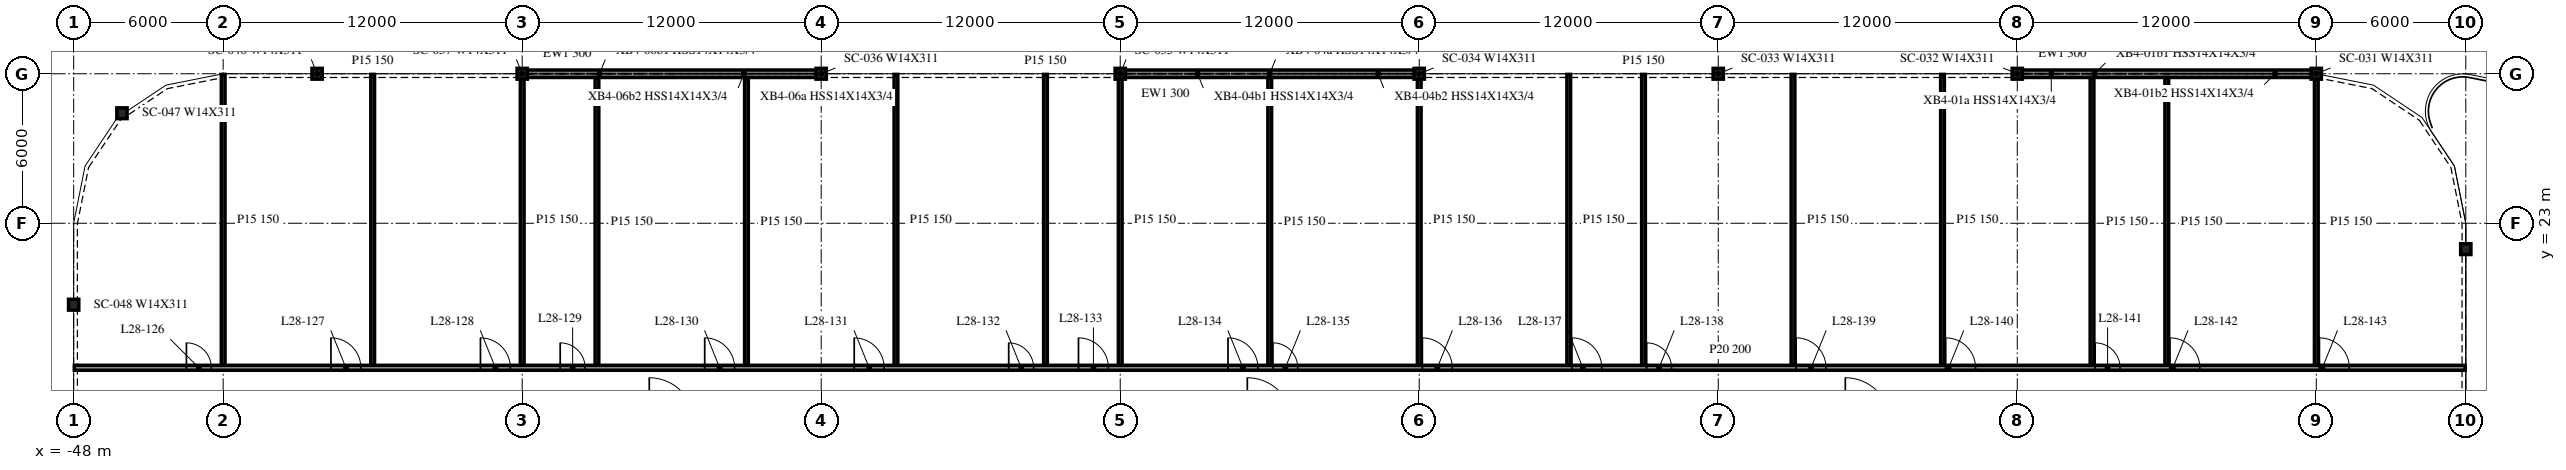
"""IFC4 building model, lengths in metres.
Left out: names, types, materials, properties, quantities, classifications, styles, units other than length and angle.
Written with IfcOpenShell. Run it as: python <this file> out.ifc"""

import sys

from ifc_helpers import new_model, si_unit, direction, frame, frame_2d, origin, origin_2d, place, context, subcontext, project, spatial, rectangle, i_section, extrude, element, fill, save


model = new_model("IFC4")
c1 = context("Model", 3, precision=1e-05, world=origin(), true_north=direction((0.0, 1.0)))
c2 = subcontext(c1, "Body", "Model", "MODEL_VIEW")
j1 = project(units=[si_unit("LENGTHUNIT", "METRE"), si_unit("PLANEANGLEUNIT", "RADIAN")], contexts=[c1])
p1 = place(None, origin())
s1 = spatial("IfcSite", under=j1, at=p1, CompositionType="ELEMENT")
p2 = place(p1, origin())
s2 = spatial("IfcBuilding", under=s1, at=p2, CompositionType="ELEMENT")
p3 = place(p2, frame((0.0, 0.0, 122.0)))
s3 = spatial("IfcBuildingStorey", under=s2, at=p3, CompositionType="ELEMENT", Elevation=122.0)
for number, where, z_axis, x_axis in (
    (1, (42.0, 29.0, -0.34), (0.0, 0.0, 1.0), (1.0, 0.0, 0.0)),
    (2, (30.0, 29.0, -0.34), (0.0, 0.0, 1.0), (1.0, 0.0, 0.0)),
    (3, (18.0, 29.0, -0.34), (0.0, 0.0, 1.0), (1.0, 0.0, 0.0)),
    (4, (6.0, 29.0, -0.34), (0.0, 0.0, 1.0), (1.0, 0.0, 0.0)),
    (5, (-6.0, 29.0, -0.34), (0.0, 0.0, 1.0), (1.0, 0.0, 0.0)),
    (6, (-18.0, 29.0, -0.34), (0.0, 0.0, 1.0), (1.0, 0.0, 0.0)),
    (7, (-30.0, 29.0, -0.34), (0.0, 0.0, 1.0), (1.0, 0.0, 0.0)),
    (8, (-38.231, 29.0, -0.34), (0.0, 0.0, 1.0), (1.0, 0.0, 0.0)),
    (9, (-46.062, 27.416, -0.34), (0.0, 0.0, 1.0), (1.0, 0.0, 0.0)),
    (10, (-48.0, 19.731, -0.34), (0.0, 0.0, 1.0), (1.0, 0.0, 0.0)),
    (11, (48.0, 21.962, -0.34), (0.0, 0.0, 1.0), (1.0, 0.0, 0.0)),
):
    element("IfcColumn", number, at=place(p3, frame(where, z_axis=z_axis, x_axis=x_axis)), inside=s3, PredefinedType="COLUMN", context=c2, shape_type="SweptSolid", body=[
        extrude(i_section(OverallWidth=0.412, OverallDepth=0.434, WebThickness=0.036, FlangeThickness=0.057, at=origin_2d()), origin(), (0.0, 0.0, 1.0), 4.1),
    ])
for number, where, z_axis, x_axis in (
    (12, (41.982, 29.0, 0.0), (0.0, 0.0, 1.0), (-1.0, 0.0, 0.0)),
    (13, (5.982, 29.0, 0.0), (0.0, 0.0, 1.0), (-1.0, 0.0, 0.0)),
    (14, (-18.018, 29.0, 0.0), (0.0, 0.0, 1.0), (-1.0, 0.0, 0.0)),
):
    element("IfcWall", number, at=place(p3, frame(where, z_axis=z_axis, x_axis=x_axis)), inside=s3, PredefinedType="NOTDEFINED", context=c2, shape_type="SweptSolid", body=[
        extrude(rectangle(XDim=11.964, YDim=0.3, at=frame_2d((5.982, 0.0))), origin(), (0.0, 0.0, 1.0), 3.003),
    ])
p4 = place(p3, frame((-47.975, 17.2, 0.0), z_axis=(0.0, 0.0, 1.0), x_axis=(1.0, 0.0, 0.0)))
e15 = element("IfcWall", 15, at=p4, inside=s3, PredefinedType="PARTITIONING", context=c2, shape_type="SweptSolid", body=[
    extrude(rectangle(XDim=95.95, YDim=0.2, at=frame_2d((47.975, 0.0))), origin(), (0.0, 0.0, 1.0), 3.76),
])
p5 = place(p4, frame((4.5, 0.0, 0.0)))
e16 = element("IfcOpeningElement", 16, at=p5, cuts=e15, PredefinedType="OPENING", context=c2, shape_type="SweptSolid", body=[
    extrude(rectangle(XDim=1.0, YDim=2.1, at=frame_2d((0.5, 1.05))), frame((0.0, 0.11, 0.0), z_axis=(0.0, -1.0, 0.0), x_axis=(1.0, 0.0, 0.0)), (0.0, 0.0, 1.0), 0.22),
])
p6 = place(p4, frame((10.3, 0.0, 0.0)))
e17 = element("IfcOpeningElement", 17, at=p6, cuts=e15, PredefinedType="OPENING", context=c2, shape_type="SweptSolid", body=[
    extrude(rectangle(XDim=1.2, YDim=2.1, at=frame_2d((0.6, 1.05))), frame((0.0, 0.11, 0.0), z_axis=(0.0, -1.0, 0.0), x_axis=(1.0, 0.0, 0.0)), (0.0, 0.0, 1.0), 0.22),
])
p7 = place(p4, frame((16.3, 0.0, 0.0)))
e18 = element("IfcOpeningElement", 18, at=p7, cuts=e15, PredefinedType="OPENING", context=c2, shape_type="SweptSolid", body=[
    extrude(rectangle(XDim=1.2, YDim=2.1, at=frame_2d((0.6, 1.05))), frame((0.0, 0.11, 0.0), z_axis=(0.0, -1.0, 0.0), x_axis=(1.0, 0.0, 0.0)), (0.0, 0.0, 1.0), 0.22),
])
p8 = place(p4, frame((19.5, 0.0, 0.0)))
e19 = element("IfcOpeningElement", 19, at=p8, cuts=e15, PredefinedType="OPENING", context=c2, shape_type="SweptSolid", body=[
    extrude(rectangle(XDim=1.0, YDim=2.1, at=frame_2d((0.5, 1.05))), frame((0.0, 0.11, 0.0), z_axis=(0.0, -1.0, 0.0), x_axis=(1.0, 0.0, 0.0)), (0.0, 0.0, 1.0), 0.22),
])
p9 = place(p4, frame((25.3, 0.0, 0.0)))
e20 = element("IfcOpeningElement", 20, at=p9, cuts=e15, PredefinedType="OPENING", context=c2, shape_type="SweptSolid", body=[
    extrude(rectangle(XDim=1.2, YDim=2.1, at=frame_2d((0.6, 1.05))), frame((0.0, 0.11, 0.0), z_axis=(0.0, -1.0, 0.0), x_axis=(1.0, 0.0, 0.0)), (0.0, 0.0, 1.0), 0.22),
])
p10 = place(p4, frame((31.3, 0.0, 0.0)))
e21 = element("IfcOpeningElement", 21, at=p10, cuts=e15, PredefinedType="OPENING", context=c2, shape_type="SweptSolid", body=[
    extrude(rectangle(XDim=1.2, YDim=2.1, at=frame_2d((0.6, 1.05))), frame((0.0, 0.11, 0.0), z_axis=(0.0, -1.0, 0.0), x_axis=(1.0, 0.0, 0.0)), (0.0, 0.0, 1.0), 0.22),
])
p11 = place(p4, frame((37.5, 0.0, 0.0)))
e22 = element("IfcOpeningElement", 22, at=p11, cuts=e15, PredefinedType="OPENING", context=c2, shape_type="SweptSolid", body=[
    extrude(rectangle(XDim=1.0, YDim=2.1, at=frame_2d((0.5, 1.05))), frame((0.0, 0.11, 0.0), z_axis=(0.0, -1.0, 0.0), x_axis=(1.0, 0.0, 0.0)), (0.0, 0.0, 1.0), 0.22),
])
p12 = place(p4, frame((40.3, 0.0, 0.0)))
e23 = element("IfcOpeningElement", 23, at=p12, cuts=e15, PredefinedType="OPENING", context=c2, shape_type="SweptSolid", body=[
    extrude(rectangle(XDim=1.2, YDim=2.1, at=frame_2d((0.6, 1.05))), frame((0.0, 0.11, 0.0), z_axis=(0.0, -1.0, 0.0), x_axis=(1.0, 0.0, 0.0)), (0.0, 0.0, 1.0), 0.22),
])
p13 = place(p4, frame((46.3, 0.0, 0.0)))
e24 = element("IfcOpeningElement", 24, at=p13, cuts=e15, PredefinedType="OPENING", context=c2, shape_type="SweptSolid", body=[
    extrude(rectangle(XDim=1.2, YDim=2.1, at=frame_2d((0.6, 1.05))), frame((0.0, 0.11, 0.0), z_axis=(0.0, -1.0, 0.0), x_axis=(1.0, 0.0, 0.0)), (0.0, 0.0, 1.0), 0.22),
])
p14 = place(p4, frame((48.1, 0.0, 0.0)))
e25 = element("IfcOpeningElement", 25, at=p14, cuts=e15, PredefinedType="OPENING", context=c2, shape_type="SweptSolid", body=[
    extrude(rectangle(XDim=1.0, YDim=2.1, at=frame_2d((0.5, 1.05))), frame((0.0, 0.11, 0.0), z_axis=(0.0, -1.0, 0.0), x_axis=(1.0, 0.0, 0.0)), (0.0, 0.0, 1.0), 0.22),
])
p15 = place(p4, frame((54.1, 0.0, 0.0)))
e26 = element("IfcOpeningElement", 26, at=p15, cuts=e15, PredefinedType="OPENING", context=c2, shape_type="SweptSolid", body=[
    extrude(rectangle(XDim=1.2, YDim=2.1, at=frame_2d((0.6, 1.05))), frame((0.0, 0.11, 0.0), z_axis=(0.0, -1.0, 0.0), x_axis=(1.0, 0.0, 0.0)), (0.0, 0.0, 1.0), 0.22),
])
p16 = place(p4, frame((60.1, 0.0, 0.0)))
e27 = element("IfcOpeningElement", 27, at=p16, cuts=e15, PredefinedType="OPENING", context=c2, shape_type="SweptSolid", body=[
    extrude(rectangle(XDim=1.2, YDim=2.1, at=frame_2d((0.6, 1.05))), frame((0.0, 0.11, 0.0), z_axis=(0.0, -1.0, 0.0), x_axis=(1.0, 0.0, 0.0)), (0.0, 0.0, 1.0), 0.22),
])
p17 = place(p4, frame((63.1, 0.0, 0.0)))
e28 = element("IfcOpeningElement", 28, at=p17, cuts=e15, PredefinedType="OPENING", context=c2, shape_type="SweptSolid", body=[
    extrude(rectangle(XDim=1.0, YDim=2.1, at=frame_2d((0.5, 1.05))), frame((0.0, 0.11, 0.0), z_axis=(0.0, -1.0, 0.0), x_axis=(1.0, 0.0, 0.0)), (0.0, 0.0, 1.0), 0.22),
])
p18 = place(p4, frame((69.1, 0.0, 0.0)))
e29 = element("IfcOpeningElement", 29, at=p18, cuts=e15, PredefinedType="OPENING", context=c2, shape_type="SweptSolid", body=[
    extrude(rectangle(XDim=1.2, YDim=2.1, at=frame_2d((0.6, 1.05))), frame((0.0, 0.11, 0.0), z_axis=(0.0, -1.0, 0.0), x_axis=(1.0, 0.0, 0.0)), (0.0, 0.0, 1.0), 0.22),
])
p19 = place(p4, frame((75.1, 0.0, 0.0)))
e30 = element("IfcOpeningElement", 30, at=p19, cuts=e15, PredefinedType="OPENING", context=c2, shape_type="SweptSolid", body=[
    extrude(rectangle(XDim=1.2, YDim=2.1, at=frame_2d((0.6, 1.05))), frame((0.0, 0.11, 0.0), z_axis=(0.0, -1.0, 0.0), x_axis=(1.0, 0.0, 0.0)), (0.0, 0.0, 1.0), 0.22),
])
p20 = place(p4, frame((81.1, 0.0, 0.0)))
e31 = element("IfcOpeningElement", 31, at=p20, cuts=e15, PredefinedType="OPENING", context=c2, shape_type="SweptSolid", body=[
    extrude(rectangle(XDim=1.0, YDim=2.1, at=frame_2d((0.5, 1.05))), frame((0.0, 0.11, 0.0), z_axis=(0.0, -1.0, 0.0), x_axis=(1.0, 0.0, 0.0)), (0.0, 0.0, 1.0), 0.22),
])
p21 = place(p4, frame((84.1, 0.0, 0.0)))
e32 = element("IfcOpeningElement", 32, at=p21, cuts=e15, PredefinedType="OPENING", context=c2, shape_type="SweptSolid", body=[
    extrude(rectangle(XDim=1.2, YDim=2.1, at=frame_2d((0.6, 1.05))), frame((0.0, 0.11, 0.0), z_axis=(0.0, -1.0, 0.0), x_axis=(1.0, 0.0, 0.0)), (0.0, 0.0, 1.0), 0.22),
])
p22 = place(p4, frame((90.1, 0.0, 0.0)))
e33 = element("IfcOpeningElement", 33, at=p22, cuts=e15, PredefinedType="OPENING", context=c2, shape_type="SweptSolid", body=[
    extrude(rectangle(XDim=1.2, YDim=2.1, at=frame_2d((0.6, 1.05))), frame((0.0, 0.11, 0.0), z_axis=(0.0, -1.0, 0.0), x_axis=(1.0, 0.0, 0.0)), (0.0, 0.0, 1.0), 0.22),
])
for number, where, z_axis, x_axis in (
    (34, (-42.0, 17.3, 0.0), (0.0, 0.0, 1.0), (0.0, 1.0, 0.0)),
    (35, (-36.0, 17.3, 0.0), (0.0, 0.0, 1.0), (0.0, 1.0, 0.0)),
    (36, (-30.0, 17.3, 0.0), (0.0, 0.0, 1.0), (0.0, 1.0, 0.0)),
):
    element("IfcWall", number, at=place(p3, frame(where, z_axis=z_axis, x_axis=x_axis)), inside=s3, PredefinedType="PARTITIONING", context=c2, shape_type="SweptSolid", body=[
        extrude(rectangle(XDim=11.675, YDim=0.15, at=frame_2d((5.837, 0.0))), origin(), (0.0, 0.0, 1.0), 3.76),
    ])
for number, where, z_axis, x_axis in (
    (37, (-27.0, 17.3, 0.0), (0.0, 0.0, 1.0), (0.0, 1.0, 0.0)),
    (38, (-21.0, 17.3, 0.0), (0.0, 0.0, 1.0), (0.0, 1.0, 0.0)),
):
    element("IfcWall", number, at=place(p3, frame(where, z_axis=z_axis, x_axis=x_axis)), inside=s3, PredefinedType="PARTITIONING", context=c2, shape_type="SweptSolid", body=[
        extrude(rectangle(XDim=11.55, YDim=0.15, at=frame_2d((5.775, 0.0))), origin(), (0.0, 0.0, 1.0), 3.76),
    ])
for number, where, z_axis, x_axis in (
    (39, (-15.0, 17.3, 0.0), (0.0, 0.0, 1.0), (0.0, 1.0, 0.0)),
    (40, (-9.0, 17.3, 0.0), (0.0, 0.0, 1.0), (0.0, 1.0, 0.0)),
    (41, (-6.0, 17.3, 0.0), (0.0, 0.0, 1.0), (0.0, 1.0, 0.0)),
):
    element("IfcWall", number, at=place(p3, frame(where, z_axis=z_axis, x_axis=x_axis)), inside=s3, PredefinedType="PARTITIONING", context=c2, shape_type="SweptSolid", body=[
        extrude(rectangle(XDim=11.675, YDim=0.15, at=frame_2d((5.837, 0.0))), origin(), (0.0, 0.0, 1.0), 3.76),
    ])
p23 = place(p3, frame((0.0, 17.3, 0.0), z_axis=(0.0, 0.0, 1.0), x_axis=(0.0, 1.0, 0.0)))
e42 = element("IfcWall", 42, at=p23, inside=s3, PredefinedType="PARTITIONING", context=c2, shape_type="SweptSolid", body=[
    extrude(rectangle(XDim=11.55, YDim=0.15, at=frame_2d((5.775, 0.0))), origin(), (0.0, 0.0, 1.0), 3.76),
])
for number, where, z_axis, x_axis in (
    (43, (6.0, 17.3, 0.0), (0.0, 0.0, 1.0), (0.0, 1.0, 0.0)),
    (44, (12.0, 17.3, 0.0), (0.0, 0.0, 1.0), (0.0, 1.0, 0.0)),
    (45, (15.0, 17.3, 0.0), (0.0, 0.0, 1.0), (0.0, 1.0, 0.0)),
    (46, (21.0, 17.3, 0.0), (0.0, 0.0, 1.0), (0.0, 1.0, 0.0)),
    (47, (27.0, 17.3, 0.0), (0.0, 0.0, 1.0), (0.0, 1.0, 0.0)),
):
    element("IfcWall", number, at=place(p3, frame(where, z_axis=z_axis, x_axis=x_axis)), inside=s3, PredefinedType="PARTITIONING", context=c2, shape_type="SweptSolid", body=[
        extrude(rectangle(XDim=11.675, YDim=0.15, at=frame_2d((5.837, 0.0))), origin(), (0.0, 0.0, 1.0), 3.76),
    ])
for number, where, z_axis, x_axis in (
    (48, (33.0, 17.3, 0.0), (0.0, 0.0, 1.0), (0.0, 1.0, 0.0)),
    (49, (36.0, 17.3, 0.0), (0.0, 0.0, 1.0), (0.0, 1.0, 0.0)),
):
    element("IfcWall", number, at=place(p3, frame(where, z_axis=z_axis, x_axis=x_axis)), inside=s3, PredefinedType="PARTITIONING", context=c2, shape_type="SweptSolid", body=[
        extrude(rectangle(XDim=11.55, YDim=0.15, at=frame_2d((5.775, 0.0))), origin(), (0.0, 0.0, 1.0), 3.76),
    ])
p24 = place(p3, frame((42.0, 17.3, 0.0), z_axis=(0.0, 0.0, 1.0), x_axis=(0.0, 1.0, 0.0)))
e50 = element("IfcWall", 50, at=p24, inside=s3, PredefinedType="PARTITIONING", context=c2, shape_type="SweptSolid", body=[
    extrude(rectangle(XDim=11.547, YDim=0.15, at=frame_2d((5.773, 0.0))), origin(), (0.0, 0.0, 1.0), 3.76),
])
p25 = place(p5, origin())
e51 = element("IfcDoor", 51, at=p25, inside=s3, OperationType="SINGLE_SWING_LEFT", PredefinedType="DOOR", context=c2, shape_type="SweptSolid", body=[
    extrude(rectangle(XDim=1.0, YDim=2.1, at=frame_2d((0.5, 1.05))), frame((0.0, 0.025, 0.0), z_axis=(0.0, -1.0, 0.0), x_axis=(1.0, 0.0, 0.0)), (0.0, 0.0, 1.0), 0.05),
])
fill(e16, e51)
p26 = place(p6, origin())
e52 = element("IfcDoor", 52, at=p26, inside=s3, OperationType="SINGLE_SWING_LEFT", PredefinedType="DOOR", context=c2, shape_type="SweptSolid", body=[
    extrude(rectangle(XDim=1.2, YDim=2.1, at=frame_2d((0.6, 1.05))), frame((0.0, 0.025, 0.0), z_axis=(0.0, -1.0, 0.0), x_axis=(1.0, 0.0, 0.0)), (0.0, 0.0, 1.0), 0.05),
])
fill(e17, e52)
p27 = place(p7, origin())
e53 = element("IfcDoor", 53, at=p27, inside=s3, OperationType="SINGLE_SWING_LEFT", PredefinedType="DOOR", context=c2, shape_type="SweptSolid", body=[
    extrude(rectangle(XDim=1.2, YDim=2.1, at=frame_2d((0.6, 1.05))), frame((0.0, 0.025, 0.0), z_axis=(0.0, -1.0, 0.0), x_axis=(1.0, 0.0, 0.0)), (0.0, 0.0, 1.0), 0.05),
])
fill(e18, e53)
p28 = place(p8, origin())
e54 = element("IfcDoor", 54, at=p28, inside=s3, OperationType="SINGLE_SWING_LEFT", PredefinedType="DOOR", context=c2, shape_type="SweptSolid", body=[
    extrude(rectangle(XDim=1.0, YDim=2.1, at=frame_2d((0.5, 1.05))), frame((0.0, 0.025, 0.0), z_axis=(0.0, -1.0, 0.0), x_axis=(1.0, 0.0, 0.0)), (0.0, 0.0, 1.0), 0.05),
])
fill(e19, e54)
p29 = place(p9, origin())
e55 = element("IfcDoor", 55, at=p29, inside=s3, OperationType="SINGLE_SWING_LEFT", PredefinedType="DOOR", context=c2, shape_type="SweptSolid", body=[
    extrude(rectangle(XDim=1.2, YDim=2.1, at=frame_2d((0.6, 1.05))), frame((0.0, 0.025, 0.0), z_axis=(0.0, -1.0, 0.0), x_axis=(1.0, 0.0, 0.0)), (0.0, 0.0, 1.0), 0.05),
])
fill(e20, e55)
p30 = place(p10, origin())
e56 = element("IfcDoor", 56, at=p30, inside=s3, OperationType="SINGLE_SWING_LEFT", PredefinedType="DOOR", context=c2, shape_type="SweptSolid", body=[
    extrude(rectangle(XDim=1.2, YDim=2.1, at=frame_2d((0.6, 1.05))), frame((0.0, 0.025, 0.0), z_axis=(0.0, -1.0, 0.0), x_axis=(1.0, 0.0, 0.0)), (0.0, 0.0, 1.0), 0.05),
])
fill(e21, e56)
p31 = place(p11, origin())
e57 = element("IfcDoor", 57, at=p31, inside=s3, OperationType="SINGLE_SWING_LEFT", PredefinedType="DOOR", context=c2, shape_type="SweptSolid", body=[
    extrude(rectangle(XDim=1.0, YDim=2.1, at=frame_2d((0.5, 1.05))), frame((0.0, 0.025, 0.0), z_axis=(0.0, -1.0, 0.0), x_axis=(1.0, 0.0, 0.0)), (0.0, 0.0, 1.0), 0.05),
])
fill(e22, e57)
p32 = place(p12, origin())
e58 = element("IfcDoor", 58, at=p32, inside=s3, OperationType="SINGLE_SWING_LEFT", PredefinedType="DOOR", context=c2, shape_type="SweptSolid", body=[
    extrude(rectangle(XDim=1.2, YDim=2.1, at=frame_2d((0.6, 1.05))), frame((0.0, 0.025, 0.0), z_axis=(0.0, -1.0, 0.0), x_axis=(1.0, 0.0, 0.0)), (0.0, 0.0, 1.0), 0.05),
])
fill(e23, e58)
p33 = place(p13, origin())
e59 = element("IfcDoor", 59, at=p33, inside=s3, OperationType="SINGLE_SWING_LEFT", PredefinedType="DOOR", context=c2, shape_type="SweptSolid", body=[
    extrude(rectangle(XDim=1.2, YDim=2.1, at=frame_2d((0.6, 1.05))), frame((0.0, 0.025, 0.0), z_axis=(0.0, -1.0, 0.0), x_axis=(1.0, 0.0, 0.0)), (0.0, 0.0, 1.0), 0.05),
])
fill(e24, e59)
p34 = place(p14, origin())
e60 = element("IfcDoor", 60, at=p34, inside=s3, OperationType="SINGLE_SWING_RIGHT", PredefinedType="DOOR", context=c2, shape_type="SweptSolid", body=[
    extrude(rectangle(XDim=1.0, YDim=2.1, at=frame_2d((0.5, 1.05))), frame((0.0, 0.025, 0.0), z_axis=(0.0, -1.0, 0.0), x_axis=(1.0, 0.0, 0.0)), (0.0, 0.0, 1.0), 0.05),
])
fill(e25, e60)
p35 = place(p15, origin())
e61 = element("IfcDoor", 61, at=p35, inside=s3, OperationType="SINGLE_SWING_RIGHT", PredefinedType="DOOR", context=c2, shape_type="SweptSolid", body=[
    extrude(rectangle(XDim=1.2, YDim=2.1, at=frame_2d((0.6, 1.05))), frame((0.0, 0.025, 0.0), z_axis=(0.0, -1.0, 0.0), x_axis=(1.0, 0.0, 0.0)), (0.0, 0.0, 1.0), 0.05),
])
fill(e26, e61)
p36 = place(p16, origin())
e62 = element("IfcDoor", 62, at=p36, inside=s3, OperationType="SINGLE_SWING_RIGHT", PredefinedType="DOOR", context=c2, shape_type="SweptSolid", body=[
    extrude(rectangle(XDim=1.2, YDim=2.1, at=frame_2d((0.6, 1.05))), frame((0.0, 0.025, 0.0), z_axis=(0.0, -1.0, 0.0), x_axis=(1.0, 0.0, 0.0)), (0.0, 0.0, 1.0), 0.05),
])
fill(e27, e62)
p37 = place(p17, origin())
e63 = element("IfcDoor", 63, at=p37, inside=s3, OperationType="SINGLE_SWING_RIGHT", PredefinedType="DOOR", context=c2, shape_type="SweptSolid", body=[
    extrude(rectangle(XDim=1.0, YDim=2.1, at=frame_2d((0.5, 1.05))), frame((0.0, 0.025, 0.0), z_axis=(0.0, -1.0, 0.0), x_axis=(1.0, 0.0, 0.0)), (0.0, 0.0, 1.0), 0.05),
])
fill(e28, e63)
p38 = place(p18, origin())
e64 = element("IfcDoor", 64, at=p38, inside=s3, OperationType="SINGLE_SWING_RIGHT", PredefinedType="DOOR", context=c2, shape_type="SweptSolid", body=[
    extrude(rectangle(XDim=1.2, YDim=2.1, at=frame_2d((0.6, 1.05))), frame((0.0, 0.025, 0.0), z_axis=(0.0, -1.0, 0.0), x_axis=(1.0, 0.0, 0.0)), (0.0, 0.0, 1.0), 0.05),
])
fill(e29, e64)
p39 = place(p19, origin())
e65 = element("IfcDoor", 65, at=p39, inside=s3, OperationType="SINGLE_SWING_RIGHT", PredefinedType="DOOR", context=c2, shape_type="SweptSolid", body=[
    extrude(rectangle(XDim=1.2, YDim=2.1, at=frame_2d((0.6, 1.05))), frame((0.0, 0.025, 0.0), z_axis=(0.0, -1.0, 0.0), x_axis=(1.0, 0.0, 0.0)), (0.0, 0.0, 1.0), 0.05),
])
fill(e30, e65)
p40 = place(p20, origin())
e66 = element("IfcDoor", 66, at=p40, inside=s3, OperationType="SINGLE_SWING_RIGHT", PredefinedType="DOOR", context=c2, shape_type="SweptSolid", body=[
    extrude(rectangle(XDim=1.0, YDim=2.1, at=frame_2d((0.5, 1.05))), frame((0.0, 0.025, 0.0), z_axis=(0.0, -1.0, 0.0), x_axis=(1.0, 0.0, 0.0)), (0.0, 0.0, 1.0), 0.05),
])
fill(e31, e66)
p41 = place(p21, origin())
e67 = element("IfcDoor", 67, at=p41, inside=s3, OperationType="SINGLE_SWING_RIGHT", PredefinedType="DOOR", context=c2, shape_type="SweptSolid", body=[
    extrude(rectangle(XDim=1.2, YDim=2.1, at=frame_2d((0.6, 1.05))), frame((0.0, 0.025, 0.0), z_axis=(0.0, -1.0, 0.0), x_axis=(1.0, 0.0, 0.0)), (0.0, 0.0, 1.0), 0.05),
])
fill(e32, e67)
p42 = place(p22, origin())
e68 = element("IfcDoor", 68, at=p42, inside=s3, OperationType="SINGLE_SWING_RIGHT", PredefinedType="DOOR", context=c2, shape_type="SweptSolid", body=[
    extrude(rectangle(XDim=1.2, YDim=2.1, at=frame_2d((0.6, 1.05))), frame((0.0, 0.025, 0.0), z_axis=(0.0, -1.0, 0.0), x_axis=(1.0, 0.0, 0.0)), (0.0, 0.0, 1.0), 0.05),
])
fill(e33, e68)
save(model, sys.argv[1])
